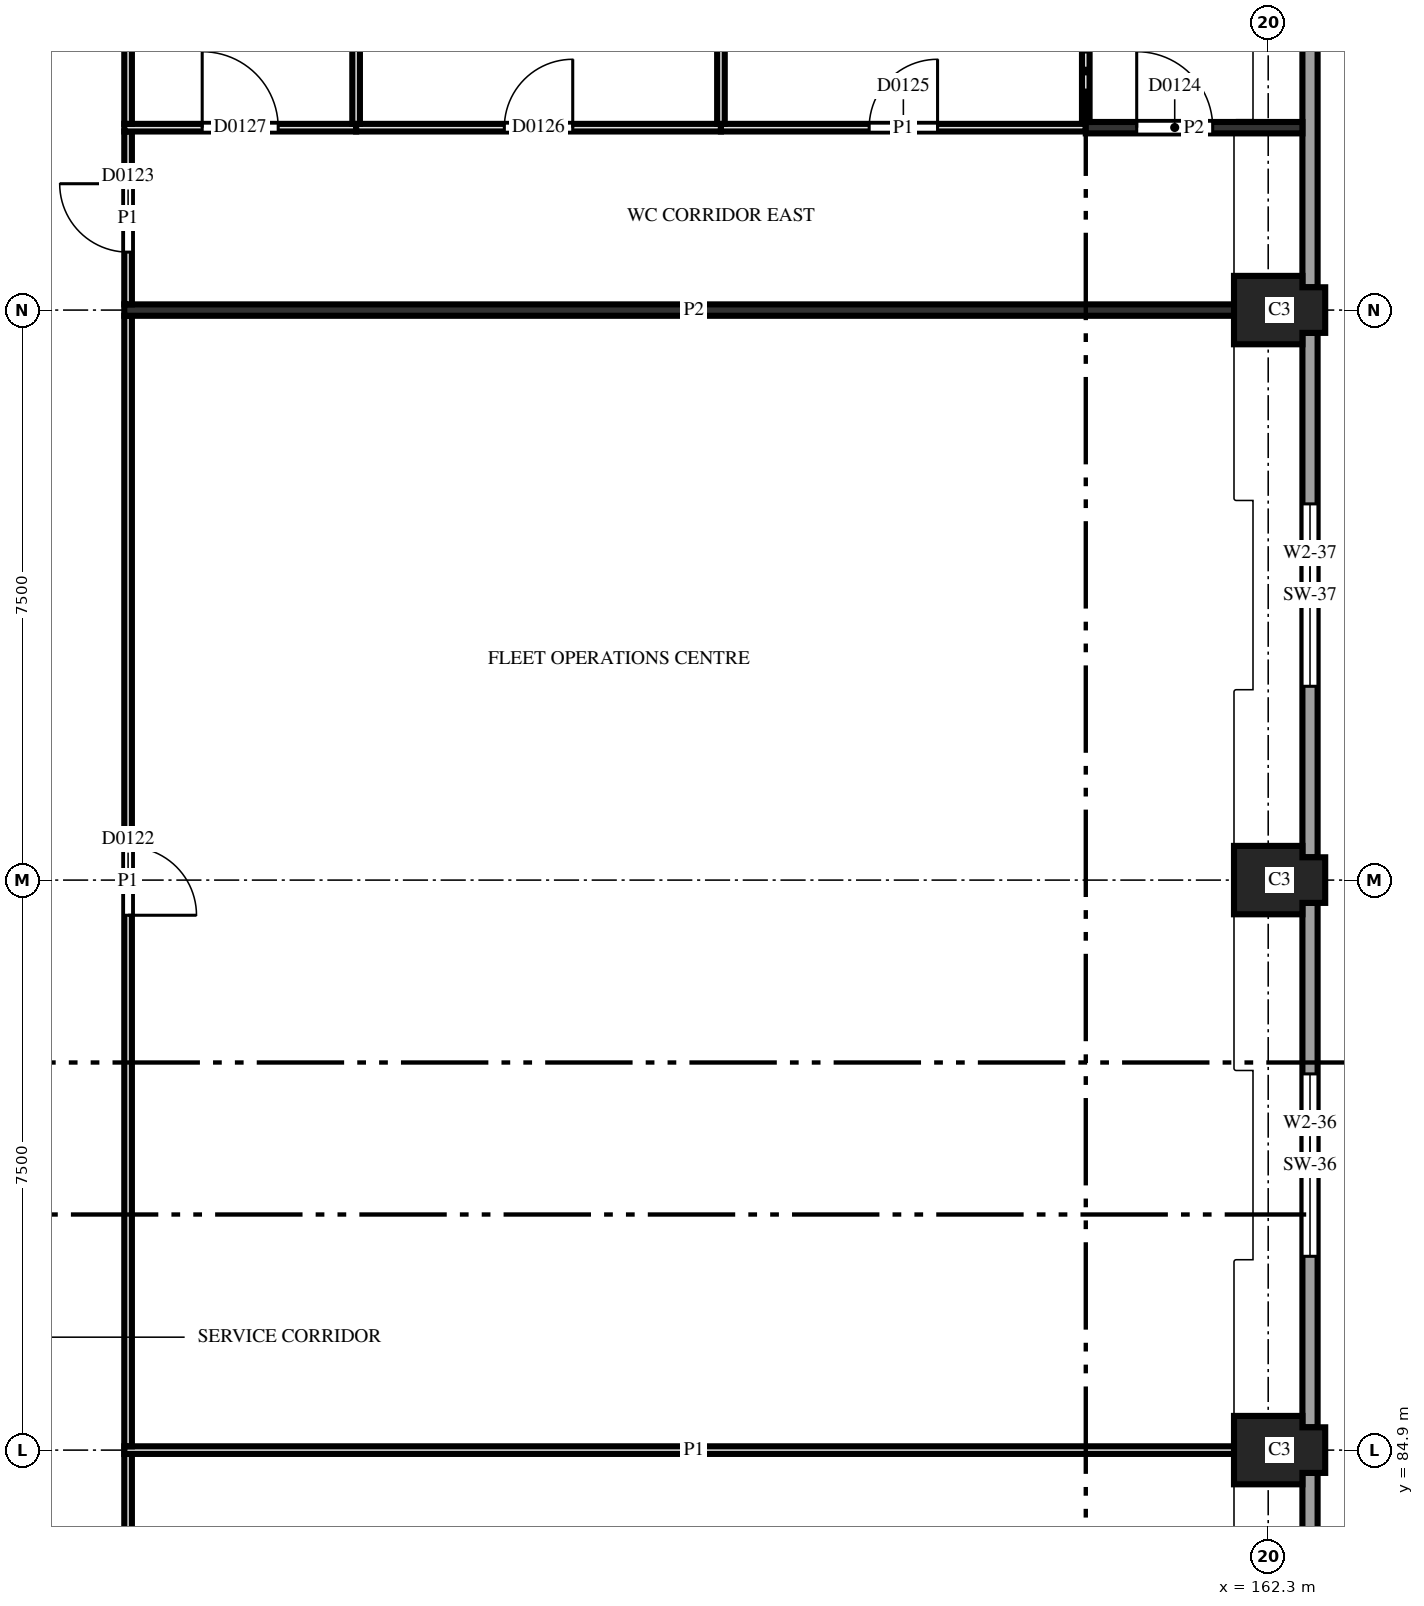
"""IFC4 building model, lengths in metres.
Left out: names, types, materials, properties, quantities, classifications, styles, units other than length and angle.
Written with IfcOpenShell. Run it as: python <this file> out.ifc"""

import sys

from ifc_helpers import new_model, si_unit, direction, frame, frame_2d, origin, place, context, subcontext, project, spatial, polyline, rectangle, outline, extrude, element, fill, save


model = new_model("IFC4")
c1 = context("Model", 3, precision=1e-05, world=origin(), true_north=direction((0.0, 1.0)))
c2 = subcontext(c1, "Body", "Model", "MODEL_VIEW")
j1 = project(units=[si_unit("LENGTHUNIT", "METRE"), si_unit("PLANEANGLEUNIT", "RADIAN")], contexts=[c1])
p1 = place(None, origin())
s1 = spatial("IfcSite", under=j1, at=p1, CompositionType="ELEMENT")
p2 = place(p1, origin())
s2 = spatial("IfcBuilding", under=s1, at=p2, CompositionType="ELEMENT")
p3 = place(p2, frame((0.0, 0.0, 4.5)))
s3 = spatial("IfcBuildingStorey", under=s2, at=p3, CompositionType="ELEMENT", Elevation=4.5)
for number, where, z_axis, x_axis in (
    (1, (162.3, 84.9, 0.0), (0.0, 0.0, 1.0), (1.0, 0.0, 0.0)),
    (2, (162.3, 92.4, 0.0), (0.0, 0.0, 1.0), (1.0, 0.0, 0.0)),
    (3, (162.3, 99.9, 0.0), (0.0, 0.0, 1.0), (1.0, 0.0, 0.0)),
):
    element("IfcColumn", number, at=place(p3, frame(where, z_axis=z_axis, x_axis=x_axis)), inside=s3, PredefinedType="COLUMN", context=c2, shape_type="SweptSolid", body=[
        extrude(outline(polyline([(-0.45, -0.45), (0.45, -0.45), (0.45, -0.3), (0.75, -0.3), (0.75, 0.3), (0.45, 0.3), (0.45, 0.45), (-0.45, 0.45), (-0.45, -0.45)])), origin(), (0.0, 0.0, 1.0), 3.7),
    ])
p4 = place(p3, frame((162.85, 77.7, 0.0), z_axis=(0.0, 0.0, 1.0), x_axis=(0.0, 1.0, 0.0)))
e4 = element("IfcWall", 4, at=p4, inside=s3, PredefinedType="SOLIDWALL", context=c2, shape_type="SweptSolid", body=[
    extrude(rectangle(XDim=6.9, YDim=0.2, at=frame_2d((3.45, 0.0))), origin(), (0.0, 0.0, 1.0), 2.3),
])
p5 = place(p4, frame((2.25, 0.0, 0.55)))
e5 = element("IfcOpeningElement", 5, at=p5, cuts=e4, PredefinedType="OPENING", context=c2, shape_type="SweptSolid", body=[
    extrude(rectangle(XDim=2.4, YDim=1.0, at=frame_2d((1.2, 0.5))), frame((0.0, 0.11, 0.0), z_axis=(0.0, -1.0, 0.0), x_axis=(1.0, 0.0, 0.0)), (0.0, 0.0, 1.0), 0.22),
])
p6 = place(p3, frame((162.85, 85.2, 0.0), z_axis=(0.0, 0.0, 1.0), x_axis=(0.0, 1.0, 0.0)))
e6 = element("IfcWall", 6, at=p6, inside=s3, PredefinedType="SOLIDWALL", context=c2, shape_type="SweptSolid", body=[
    extrude(rectangle(XDim=6.9, YDim=0.2, at=frame_2d((3.45, 0.0))), origin(), (0.0, 0.0, 1.0), 2.3),
])
p7 = place(p6, frame((2.25, 0.0, 0.55)))
e7 = element("IfcOpeningElement", 7, at=p7, cuts=e6, PredefinedType="OPENING", context=c2, shape_type="SweptSolid", body=[
    extrude(rectangle(XDim=2.4, YDim=1.0, at=frame_2d((1.2, 0.5))), frame((0.0, 0.11, 0.0), z_axis=(0.0, -1.0, 0.0), x_axis=(1.0, 0.0, 0.0)), (0.0, 0.0, 1.0), 0.22),
])
p8 = place(p3, frame((162.85, 92.7, 0.0), z_axis=(0.0, 0.0, 1.0), x_axis=(0.0, 1.0, 0.0)))
e8 = element("IfcWall", 8, at=p8, inside=s3, PredefinedType="SOLIDWALL", context=c2, shape_type="SweptSolid", body=[
    extrude(rectangle(XDim=6.9, YDim=0.2, at=frame_2d((3.45, 0.0))), origin(), (0.0, 0.0, 1.0), 2.3),
])
p9 = place(p8, frame((2.25, 0.0, 0.55)))
e9 = element("IfcOpeningElement", 9, at=p9, cuts=e8, PredefinedType="OPENING", context=c2, shape_type="SweptSolid", body=[
    extrude(rectangle(XDim=2.4, YDim=1.0, at=frame_2d((1.2, 0.5))), frame((0.0, 0.11, 0.0), z_axis=(0.0, -1.0, 0.0), x_axis=(1.0, 0.0, 0.0)), (0.0, 0.0, 1.0), 0.22),
])
p10 = place(p3, frame((162.85, 100.2, 0.0), z_axis=(0.0, 0.0, 1.0), x_axis=(0.0, 1.0, 0.0)))
e10 = element("IfcWall", 10, at=p10, inside=s3, PredefinedType="SOLIDWALL", context=c2, shape_type="SweptSolid", body=[
    extrude(rectangle(XDim=6.9, YDim=0.2, at=frame_2d((3.45, 0.0))), origin(), (0.0, 0.0, 1.0), 2.3),
])
p11 = place(p10, frame((3.4, 0.0, 0.55)))
e11 = element("IfcOpeningElement", 11, at=p11, cuts=e10, PredefinedType="OPENING", context=c2, shape_type="SweptSolid", body=[
    extrude(rectangle(XDim=2.4, YDim=1.0, at=frame_2d((1.2, 0.5))), frame((0.0, 0.11, 0.0), z_axis=(0.0, -1.0, 0.0), x_axis=(1.0, 0.0, 0.0)), (0.0, 0.0, 1.0), 0.22),
])
p12 = place(p3, frame((147.3, 84.85, 0.0), z_axis=(0.0, 0.0, 1.0), x_axis=(0.0, -1.0, 0.0)))
e12 = element("IfcWall", 12, at=p12, inside=s3, PredefinedType="PARTITIONING", context=c2, shape_type="SweptSolid", body=[
    extrude(rectangle(XDim=7.4, YDim=0.1, at=frame_2d((3.7, 0.0))), origin(), (0.0, 0.0, 1.0), 2.88),
])
p13 = place(p12, frame((3.25, 0.0, 0.0)))
e13 = element("IfcOpeningElement", 13, at=p13, cuts=e12, PredefinedType="OPENING", context=c2, shape_type="SweptSolid", body=[
    extrude(rectangle(XDim=0.9, YDim=2.1, at=frame_2d((0.45, 1.05))), frame((0.0, 0.06, 0.0), z_axis=(0.0, -1.0, 0.0), x_axis=(1.0, 0.0, 0.0)), (0.0, 0.0, 1.0), 0.12),
])
p14 = place(p3, frame((162.24, 84.9, 0.0), z_axis=(0.0, 0.0, 1.0), x_axis=(-1.0, 0.0, 0.0)))
e14 = element("IfcWall", 14, at=p14, inside=s3, PredefinedType="PARTITIONING", context=c2, shape_type="SweptSolid", body=[
    extrude(rectangle(XDim=14.99, YDim=0.1, at=frame_2d((7.495, 0.0))), origin(), (0.0, 0.0, 1.0), 2.88),
])
p15 = place(p3, frame((147.3, 99.825, 0.0), z_axis=(0.0, 0.0, 1.0), x_axis=(0.0, -1.0, 0.0)))
e15 = element("IfcWall", 15, at=p15, inside=s3, PredefinedType="PARTITIONING", context=c2, shape_type="SweptSolid", body=[
    extrude(rectangle(XDim=14.875, YDim=0.1, at=frame_2d((7.438, 0.0))), origin(), (0.0, 0.0, 1.0), 2.88),
])
p16 = place(p15, frame((6.988, 0.0, 0.0)))
e16 = element("IfcOpeningElement", 16, at=p16, cuts=e15, PredefinedType="OPENING", context=c2, shape_type="SweptSolid", body=[
    extrude(rectangle(XDim=0.9, YDim=2.1, at=frame_2d((0.45, 1.05))), frame((0.0, 0.06, 0.0), z_axis=(0.0, -1.0, 0.0), x_axis=(1.0, 0.0, 0.0)), (0.0, 0.0, 1.0), 0.12),
])
p17 = place(p3, frame((162.24, 99.9, 0.0), z_axis=(0.0, 0.0, 1.0), x_axis=(-1.0, 0.0, 0.0)))
e17 = element("IfcWall", 17, at=p17, inside=s3, PredefinedType="PARTITIONING", context=c2, shape_type="SweptSolid", body=[
    extrude(rectangle(XDim=14.99, YDim=0.15, at=frame_2d((7.495, 0.0))), origin(), (0.0, 0.0, 1.0), 2.88),
])
p18 = place(p3, frame((147.3, 102.25, 0.0), z_axis=(0.0, 0.0, 1.0), x_axis=(0.0, -1.0, 0.0)))
e18 = element("IfcWall", 18, at=p18, inside=s3, PredefinedType="PARTITIONING", context=c2, shape_type="SweptSolid", body=[
    extrude(rectangle(XDim=2.275, YDim=0.1, at=frame_2d((1.137, 0.0))), origin(), (0.0, 0.0, 1.0), 2.88),
])
p19 = place(p18, frame((0.688, 0.0, 0.0)))
e19 = element("IfcOpeningElement", 19, at=p19, cuts=e18, PredefinedType="OPENING", context=c2, shape_type="SweptSolid", body=[
    extrude(rectangle(XDim=0.9, YDim=2.1, at=frame_2d((0.45, 1.05))), frame((0.0, 0.06, 0.0), z_axis=(0.0, -1.0, 0.0), x_axis=(1.0, 0.0, 0.0)), (0.0, 0.0, 1.0), 0.12),
])
p20 = place(p3, frame((150.3, 102.3, 0.0), z_axis=(0.0, 0.0, 1.0), x_axis=(-1.0, 0.0, 0.0)))
e20 = element("IfcWall", 20, at=p20, inside=s3, PredefinedType="PARTITIONING", context=c2, shape_type="SweptSolid", body=[
    extrude(rectangle(XDim=3.05, YDim=0.1, at=frame_2d((1.525, 0.0))), origin(), (0.0, 0.0, 1.0), 2.88),
])
p21 = place(p20, frame((1.025, 0.0, 0.0)))
e21 = element("IfcOpeningElement", 21, at=p21, cuts=e20, PredefinedType="OPENING", context=c2, shape_type="SweptSolid", body=[
    extrude(rectangle(XDim=1.0, YDim=2.1, at=frame_2d((0.5, 1.05))), frame((0.0, 0.06, 0.0), z_axis=(0.0, -1.0, 0.0), x_axis=(1.0, 0.0, 0.0)), (0.0, 0.0, 1.0), 0.12),
])
p22 = place(p3, frame((155.1, 102.3, 0.0), z_axis=(0.0, 0.0, 1.0), x_axis=(-1.0, 0.0, 0.0)))
e22 = element("IfcWall", 22, at=p22, inside=s3, PredefinedType="PARTITIONING", context=c2, shape_type="SweptSolid", body=[
    extrude(rectangle(XDim=4.8, YDim=0.1, at=frame_2d((2.4, 0.0))), origin(), (0.0, 0.0, 1.0), 2.88),
])
p23 = place(p22, frame((1.95, 0.0, 0.0)))
e23 = element("IfcOpeningElement", 23, at=p23, cuts=e22, PredefinedType="OPENING", context=c2, shape_type="SweptSolid", body=[
    extrude(rectangle(XDim=0.9, YDim=2.1, at=frame_2d((0.45, 1.05))), frame((0.0, 0.06, 0.0), z_axis=(0.0, -1.0, 0.0), x_axis=(1.0, 0.0, 0.0)), (0.0, 0.0, 1.0), 0.12),
])
p24 = place(p3, frame((159.9, 102.3, 0.0), z_axis=(0.0, 0.0, 1.0), x_axis=(-1.0, 0.0, 0.0)))
e24 = element("IfcWall", 24, at=p24, inside=s3, PredefinedType="PARTITIONING", context=c2, shape_type="SweptSolid", body=[
    extrude(rectangle(XDim=4.8, YDim=0.1, at=frame_2d((2.4, 0.0))), origin(), (0.0, 0.0, 1.0), 2.88),
])
p25 = place(p24, frame((1.95, 0.0, 0.0)))
e25 = element("IfcOpeningElement", 25, at=p25, cuts=e24, PredefinedType="OPENING", context=c2, shape_type="SweptSolid", body=[
    extrude(rectangle(XDim=0.9, YDim=2.1, at=frame_2d((0.45, 1.05))), frame((0.0, 0.06, 0.0), z_axis=(0.0, -1.0, 0.0), x_axis=(1.0, 0.0, 0.0)), (0.0, 0.0, 1.0), 0.12),
])
p26 = place(p3, frame((162.75, 102.3, 0.0), z_axis=(0.0, 0.0, 1.0), x_axis=(-1.0, 0.0, 0.0)))
e26 = element("IfcWall", 26, at=p26, inside=s3, PredefinedType="PARTITIONING", context=c2, shape_type="SweptSolid", body=[
    extrude(rectangle(XDim=2.85, YDim=0.15, at=frame_2d((1.425, 0.0))), origin(), (0.0, 0.0, 1.0), 2.88),
])
p27 = place(p26, frame((1.18, 0.0, 0.0)))
e27 = element("IfcOpeningElement", 27, at=p27, cuts=e26, PredefinedType="OPENING", context=c2, shape_type="SweptSolid", body=[
    extrude(rectangle(XDim=1.0, YDim=2.1, at=frame_2d((0.5, 1.05))), frame((0.0, 0.085, 0.0), z_axis=(0.0, -1.0, 0.0), x_axis=(1.0, 0.0, 0.0)), (0.0, 0.0, 1.0), 0.17),
])
for number, where, z_axis, x_axis in (
    (28, (147.3, 107.35, 0.0), (0.0, 0.0, 1.0), (0.0, -1.0, 0.0)),
    (29, (150.3, 107.35, 0.0), (0.0, 0.0, 1.0), (0.0, -1.0, 0.0)),
):
    element("IfcWall", number, at=place(p3, frame(where, z_axis=z_axis, x_axis=x_axis)), inside=s3, PredefinedType="PARTITIONING", context=c2, shape_type="SweptSolid", body=[
        extrude(rectangle(XDim=5.0, YDim=0.1, at=frame_2d((2.5, 0.0))), origin(), (0.0, 0.0, 1.0), 2.88),
    ])
p28 = place(p3, frame((155.1, 107.3, 0.0), z_axis=(0.0, 0.0, 1.0), x_axis=(0.0, -1.0, 0.0)))
e30 = element("IfcWall", 30, at=p28, inside=s3, PredefinedType="PARTITIONING", context=c2, shape_type="SweptSolid", body=[
    extrude(rectangle(XDim=4.95, YDim=0.1, at=frame_2d((2.475, 0.0))), origin(), (0.0, 0.0, 1.0), 2.88),
])
p29 = place(p3, frame((159.9, 107.35, 0.0), z_axis=(0.0, 0.0, 1.0), x_axis=(0.0, -1.0, 0.0)))
e31 = element("IfcWall", 31, at=p29, inside=s3, PredefinedType="PARTITIONING", context=c2, shape_type="SweptSolid", body=[
    extrude(rectangle(XDim=4.975, YDim=0.1, at=frame_2d((2.488, 0.0))), origin(), (0.0, 0.0, 1.0), 2.88),
])
p30 = place(p7, origin())
e32 = element("IfcWindow", 32, at=p30, inside=s3, PartitioningType="SINGLE_PANEL", PredefinedType="WINDOW", context=c2, shape_type="SweptSolid", body=[
    extrude(rectangle(XDim=2.4, YDim=1.0, at=frame_2d((1.2, 0.5))), frame((0.0, 0.03, 0.0), z_axis=(0.0, -1.0, 0.0), x_axis=(1.0, 0.0, 0.0)), (0.0, 0.0, 1.0), 0.06),
])
fill(e7, e32)
p31 = place(p9, origin())
e33 = element("IfcWindow", 33, at=p31, inside=s3, PartitioningType="SINGLE_PANEL", PredefinedType="WINDOW", context=c2, shape_type="SweptSolid", body=[
    extrude(rectangle(XDim=2.4, YDim=1.0, at=frame_2d((1.2, 0.5))), frame((0.0, 0.03, 0.0), z_axis=(0.0, -1.0, 0.0), x_axis=(1.0, 0.0, 0.0)), (0.0, 0.0, 1.0), 0.06),
])
fill(e9, e33)
p32 = place(p16, origin())
e34 = element("IfcDoor", 34, at=p32, inside=s3, OperationType="SINGLE_SWING_LEFT", PredefinedType="DOOR", context=c2, shape_type="SweptSolid", body=[
    extrude(rectangle(XDim=0.9, YDim=2.1, at=frame_2d((0.45, 1.05))), frame((0.0, 0.025, 0.0), z_axis=(0.0, -1.0, 0.0), x_axis=(1.0, 0.0, 0.0)), (0.0, 0.0, 1.0), 0.05),
])
fill(e16, e34)
p33 = place(p19, origin())
e35 = element("IfcDoor", 35, at=p33, inside=s3, OperationType="SINGLE_SWING_LEFT", PredefinedType="DOOR", context=c2, shape_type="SweptSolid", body=[
    extrude(rectangle(XDim=0.9, YDim=2.1, at=frame_2d((0.45, 1.05))), frame((0.0, 0.025, 0.0), z_axis=(0.0, -1.0, 0.0), x_axis=(1.0, 0.0, 0.0)), (0.0, 0.0, 1.0), 0.05),
])
fill(e19, e35)
p34 = place(p27, origin())
e36 = element("IfcDoor", 36, at=p34, inside=s3, OperationType="SINGLE_SWING_RIGHT", PredefinedType="DOOR", context=c2, shape_type="SweptSolid", body=[
    extrude(rectangle(XDim=1.0, YDim=2.1, at=frame_2d((0.5, 1.05))), frame((0.0, 0.025, 0.0), z_axis=(0.0, -1.0, 0.0), x_axis=(1.0, 0.0, 0.0)), (0.0, 0.0, 1.0), 0.05),
])
fill(e27, e36)
p35 = place(p25, origin())
e37 = element("IfcDoor", 37, at=p35, inside=s3, OperationType="SINGLE_SWING_LEFT", PredefinedType="DOOR", context=c2, shape_type="SweptSolid", body=[
    extrude(rectangle(XDim=0.9, YDim=2.1, at=frame_2d((0.45, 1.05))), frame((0.0, 0.025, 0.0), z_axis=(0.0, -1.0, 0.0), x_axis=(1.0, 0.0, 0.0)), (0.0, 0.0, 1.0), 0.05),
])
fill(e25, e37)
p36 = place(p23, origin())
e38 = element("IfcDoor", 38, at=p36, inside=s3, OperationType="SINGLE_SWING_LEFT", PredefinedType="DOOR", context=c2, shape_type="SweptSolid", body=[
    extrude(rectangle(XDim=0.9, YDim=2.1, at=frame_2d((0.45, 1.05))), frame((0.0, 0.025, 0.0), z_axis=(0.0, -1.0, 0.0), x_axis=(1.0, 0.0, 0.0)), (0.0, 0.0, 1.0), 0.05),
])
fill(e23, e38)
p37 = place(p21, origin())
e39 = element("IfcDoor", 39, at=p37, inside=s3, OperationType="SINGLE_SWING_RIGHT", PredefinedType="DOOR", context=c2, shape_type="SweptSolid", body=[
    extrude(rectangle(XDim=1.0, YDim=2.1, at=frame_2d((0.5, 1.05))), frame((0.0, 0.025, 0.0), z_axis=(0.0, -1.0, 0.0), x_axis=(1.0, 0.0, 0.0)), (0.0, 0.0, 1.0), 0.05),
])
fill(e21, e39)
save(model, sys.argv[1])
